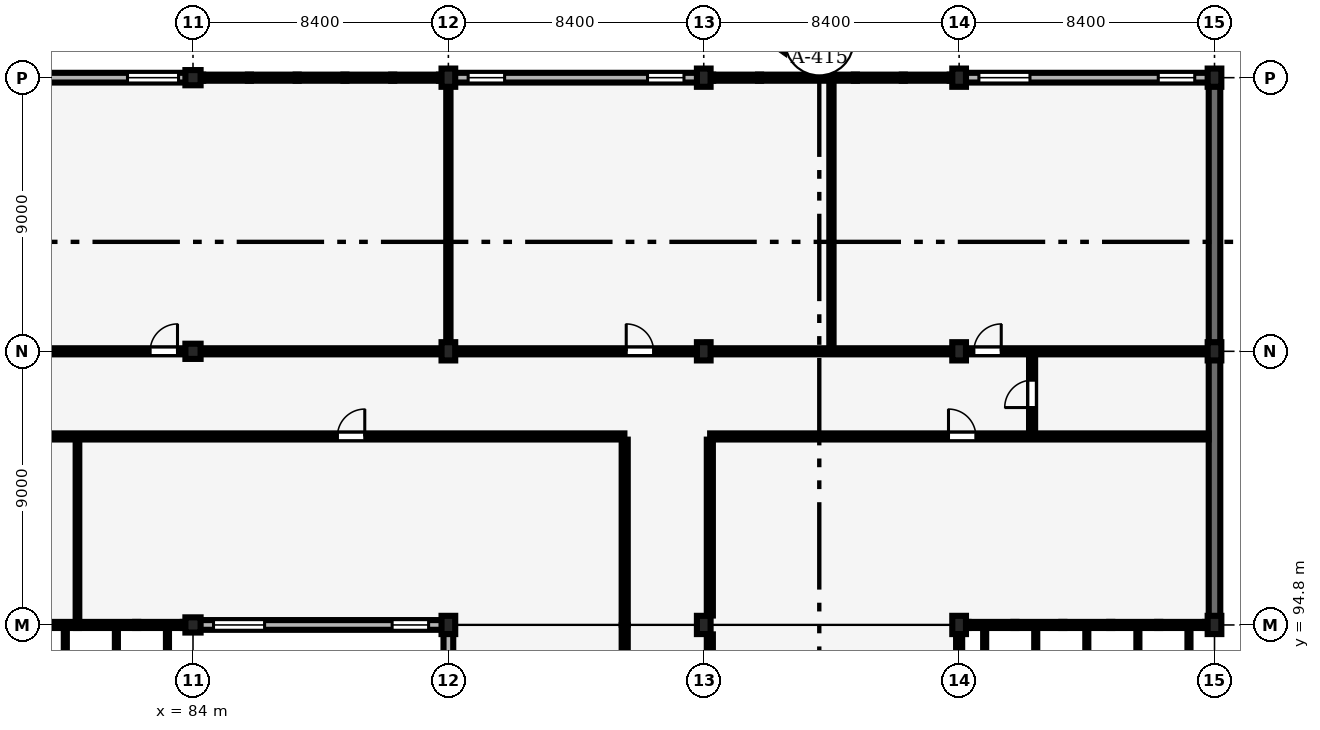
"""IFC4 building model, lengths in metres.
Left out: names, types, materials, properties, quantities, classifications, styles, units other than length and angle.
Written with IfcOpenShell. Run it as: python <this file> out.ifc"""

import sys

from ifc_helpers import new_model, si_unit, direction, frame, frame_2d, origin, origin_2d, place, context, subcontext, project, spatial, rectangle, extrude, element, fill, save


model = new_model("IFC4")
c1 = context("Model", 3, precision=1e-05, world=origin(), true_north=direction((0.0, 1.0)))
c2 = subcontext(c1, "Body", "Model", "MODEL_VIEW")
j1 = project(units=[si_unit("LENGTHUNIT", "METRE"), si_unit("PLANEANGLEUNIT", "RADIAN")], contexts=[c1])
p1 = place(None, origin())
s1 = spatial("IfcSite", under=j1, at=p1, CompositionType="ELEMENT")
p2 = place(p1, origin())
s2 = spatial("IfcBuilding", under=s1, at=p2, CompositionType="ELEMENT")
p3 = place(p2, frame((0.0, 0.0, 13.2)))
s3 = spatial("IfcBuildingStorey", under=s2, at=p3, CompositionType="ELEMENT", Elevation=13.2)
for number, where, z_axis, x_axis in (
    (1, (84.0, 94.8, 0.0), (0.0, 0.0, 1.0), (1.0, 0.0, 0.0)),
    (2, (84.0, 103.8, 0.0), (0.0, 0.0, 1.0), (1.0, 0.0, 0.0)),
    (3, (84.0, 112.8, 0.0), (0.0, 0.0, 1.0), (1.0, 0.0, 0.0)),
):
    element("IfcColumn", number, at=place(p3, frame(where, z_axis=z_axis, x_axis=x_axis)), inside=s3, PredefinedType="COLUMN", context=c2, shape_type="SweptSolid", body=[
        extrude(rectangle(XDim=0.5, YDim=0.5, at=origin_2d()), origin(), (0.0, 0.0, 1.0), 4.2),
    ])
for number, where, z_axis, x_axis in (
    (4, (92.4, 94.8, 0.0), (0.0, 0.0, 1.0), (1.0, 0.0, 0.0)),
    (5, (92.4, 103.8, 0.0), (0.0, 0.0, 1.0), (1.0, 0.0, 0.0)),
    (6, (92.4, 112.8, 0.0), (0.0, 0.0, 1.0), (1.0, 0.0, 0.0)),
    (7, (100.8, 94.8, 0.0), (0.0, 0.0, 1.0), (1.0, 0.0, 0.0)),
    (8, (100.8, 103.8, 0.0), (0.0, 0.0, 1.0), (1.0, 0.0, 0.0)),
    (9, (100.8, 112.8, 0.0), (0.0, 0.0, 1.0), (1.0, 0.0, 0.0)),
    (10, (109.2, 94.8, 0.0), (0.0, 0.0, 1.0), (1.0, 0.0, 0.0)),
    (11, (109.2, 103.8, 0.0), (0.0, 0.0, 1.0), (1.0, 0.0, 0.0)),
    (12, (109.2, 112.8, 0.0), (0.0, 0.0, 1.0), (1.0, 0.0, 0.0)),
    (13, (117.6, 94.8, 0.0), (0.0, 0.0, 1.0), (1.0, 0.0, 0.0)),
    (14, (117.6, 103.8, 0.0), (0.0, 0.0, 1.0), (1.0, 0.0, 0.0)),
    (15, (117.6, 112.8, 0.0), (0.0, 0.0, 1.0), (1.0, 0.0, 0.0)),
):
    element("IfcColumn", number, at=place(p3, frame(where, z_axis=z_axis, x_axis=x_axis)), inside=s3, PredefinedType="COLUMN", context=c2, shape_type="SweptSolid", body=[
        extrude(rectangle(XDim=0.45, YDim=0.6, at=origin_2d()), origin(), (0.0, 0.0, 1.0), 4.2),
    ])
p4 = place(p3, frame((117.6, 95.075, 0.0), z_axis=(0.0, 0.0, 1.0), x_axis=(0.0, 1.0, 0.0)))
e16 = element("IfcWall", 16, at=p4, inside=s3, PredefinedType="SHEAR", context=c2, shape_type="SweptSolid", body=[
    extrude(rectangle(XDim=8.45, YDim=0.38, at=frame_2d((4.225, 0.0))), origin(), (0.0, 0.0, 1.0), 3.43),
])
p5 = place(p3, frame((117.6, 104.075, 0.0), z_axis=(0.0, 0.0, 1.0), x_axis=(0.0, 1.0, 0.0)))
e17 = element("IfcWall", 17, at=p5, inside=s3, PredefinedType="SHEAR", context=c2, shape_type="SweptSolid", body=[
    extrude(rectangle(XDim=8.45, YDim=0.38, at=frame_2d((4.225, 0.0))), origin(), (0.0, 0.0, 1.0), 3.48),
])
p6 = place(p3, frame((75.825, 112.8, 0.0), z_axis=(0.0, 0.0, 1.0), x_axis=(1.0, 0.0, 0.0)))
e18 = element("IfcWall", 18, at=p6, inside=s3, PredefinedType="SOLIDWALL", context=c2, shape_type="SweptSolid", body=[
    extrude(rectangle(XDim=7.95, YDim=0.32, at=frame_2d((3.975, 0.0))), origin(), (0.0, 0.0, 1.0), 2.96),
])
p7 = place(p6, frame((0.45, 0.0, 0.9)))
e19 = element("IfcOpeningElement", 19, at=p7, cuts=e18, PredefinedType="OPENING", context=c2, shape_type="SweptSolid", body=[
    extrude(rectangle(XDim=1.2, YDim=1.8, at=frame_2d((0.6, 0.9))), frame((0.0, 0.17, 0.0), z_axis=(0.0, -1.0, 0.0), x_axis=(1.0, 0.0, 0.0)), (0.0, 0.0, 1.0), 0.34),
])
p8 = place(p6, frame((6.02, 0.0, 0.9)))
e20 = element("IfcOpeningElement", 20, at=p8, cuts=e18, PredefinedType="OPENING", context=c2, shape_type="SweptSolid", body=[
    extrude(rectangle(XDim=1.68, YDim=1.91, at=frame_2d((0.84, 0.955))), frame((0.0, 0.17, 0.0), z_axis=(0.0, -1.0, 0.0), x_axis=(1.0, 0.0, 0.0)), (0.0, 0.0, 1.0), 0.34),
])
p9 = place(p3, frame((92.6, 112.8, 0.0), z_axis=(0.0, 0.0, 1.0), x_axis=(1.0, 0.0, 0.0)))
e21 = element("IfcWall", 21, at=p9, inside=s3, PredefinedType="SOLIDWALL", context=c2, shape_type="SweptSolid", body=[
    extrude(rectangle(XDim=8.0, YDim=0.32, at=frame_2d((4.0, 0.0))), origin(), (0.0, 0.0, 1.0), 3.43),
])
p10 = place(p9, frame((0.45, 0.0, 0.9)))
e22 = element("IfcOpeningElement", 22, at=p10, cuts=e21, PredefinedType="OPENING", context=c2, shape_type="SweptSolid", body=[
    extrude(rectangle(XDim=1.2, YDim=1.5, at=frame_2d((0.6, 0.75))), frame((0.0, 0.17, 0.0), z_axis=(0.0, -1.0, 0.0), x_axis=(1.0, 0.0, 0.0)), (0.0, 0.0, 1.0), 0.34),
])
p11 = place(p9, frame((6.35, 0.0, 0.9)))
e23 = element("IfcOpeningElement", 23, at=p11, cuts=e21, PredefinedType="OPENING", context=c2, shape_type="SweptSolid", body=[
    extrude(rectangle(XDim=1.2, YDim=1.8, at=frame_2d((0.6, 0.9))), frame((0.0, 0.17, 0.0), z_axis=(0.0, -1.0, 0.0), x_axis=(1.0, 0.0, 0.0)), (0.0, 0.0, 1.0), 0.34),
])
p12 = place(p3, frame((109.4, 112.8, 0.0), z_axis=(0.0, 0.0, 1.0), x_axis=(1.0, 0.0, 0.0)))
e24 = element("IfcWall", 24, at=p12, inside=s3, PredefinedType="SOLIDWALL", context=c2, shape_type="SweptSolid", body=[
    extrude(rectangle(XDim=8.0, YDim=0.32, at=frame_2d((4.0, 0.0))), origin(), (0.0, 0.0, 1.0), 3.43),
])
p13 = place(p12, frame((0.45, 0.0, 0.9)))
e25 = element("IfcOpeningElement", 25, at=p13, cuts=e24, PredefinedType="OPENING", context=c2, shape_type="SweptSolid", body=[
    extrude(rectangle(XDim=1.68, YDim=2.4, at=frame_2d((0.84, 1.2))), frame((0.0, 0.17, 0.0), z_axis=(0.0, -1.0, 0.0), x_axis=(1.0, 0.0, 0.0)), (0.0, 0.0, 1.0), 0.34),
])
p14 = place(p12, frame((6.35, 0.0, 0.9)))
e26 = element("IfcOpeningElement", 26, at=p14, cuts=e24, PredefinedType="OPENING", context=c2, shape_type="SweptSolid", body=[
    extrude(rectangle(XDim=1.2, YDim=1.5, at=frame_2d((0.6, 0.75))), frame((0.0, 0.17, 0.0), z_axis=(0.0, -1.0, 0.0), x_axis=(1.0, 0.0, 0.0)), (0.0, 0.0, 1.0), 0.34),
])
p15 = place(p3, frame((84.225, 94.8, 0.0), z_axis=(0.0, 0.0, 1.0), x_axis=(1.0, 0.0, 0.0)))
e27 = element("IfcWall", 27, at=p15, inside=s3, PredefinedType="SOLIDWALL", context=c2, shape_type="SweptSolid", body=[
    extrude(rectangle(XDim=7.975, YDim=0.32, at=frame_2d((3.987, 0.0))), origin(), (0.0, 0.0, 1.0), 3.48),
])
p16 = place(p15, frame((0.45, 0.0, 0.9)))
e28 = element("IfcOpeningElement", 28, at=p16, cuts=e27, PredefinedType="OPENING", context=c2, shape_type="SweptSolid", body=[
    extrude(rectangle(XDim=1.68, YDim=2.4, at=frame_2d((0.84, 1.2))), frame((0.0, 0.17, 0.0), z_axis=(0.0, -1.0, 0.0), x_axis=(1.0, 0.0, 0.0)), (0.0, 0.0, 1.0), 0.34),
])
p17 = place(p15, frame((6.325, 0.0, 0.9)))
e29 = element("IfcOpeningElement", 29, at=p17, cuts=e27, PredefinedType="OPENING", context=c2, shape_type="SweptSolid", body=[
    extrude(rectangle(XDim=1.2, YDim=1.5, at=frame_2d((0.6, 0.75))), frame((0.0, 0.17, 0.0), z_axis=(0.0, -1.0, 0.0), x_axis=(1.0, 0.0, 0.0)), (0.0, 0.0, 1.0), 0.34),
])
p18 = place(p3, frame((92.4, 86.075, 0.0), z_axis=(0.0, 0.0, 1.0), x_axis=(0.0, 1.0, 0.0)))
e30 = element("IfcWall", 30, at=p18, inside=s3, PredefinedType="SOLIDWALL", context=c2, shape_type="SweptSolid", body=[
    extrude(rectangle(XDim=8.45, YDim=0.32, at=frame_2d((4.225, 0.0))), origin(), (0.0, 0.0, 1.0), 3.48),
])
p19 = place(p18, frame((3.025, 0.0, 0.9)))
e31 = element("IfcOpeningElement", 31, at=p19, cuts=e30, PredefinedType="OPENING", context=c2, shape_type="SweptSolid", body=[
    extrude(rectangle(XDim=2.4, YDim=1.8, at=frame_2d((1.2, 0.9))), frame((0.0, 0.17, 0.0), z_axis=(0.0, -1.0, 0.0), x_axis=(1.0, 0.0, 0.0)), (0.0, 0.0, 1.0), 0.34),
])
p20 = place(p3, frame((111.6, 101.01, 0.0), z_axis=(0.0, 0.0, 1.0), x_axis=(0.0, 1.0, 0.0)))
e32 = element("IfcWall", 32, at=p20, inside=s3, PredefinedType="PARTITIONING", context=c2, shape_type="SweptSolid", body=[
    extrude(rectangle(XDim=2.78, YDim=0.2, at=frame_2d((1.39, 0.0))), origin(), (0.0, 0.0, 1.0), 3.9),
])
p21 = place(p20, frame((0.94, 0.0, 0.0)))
e33 = element("IfcOpeningElement", 33, at=p21, cuts=e32, PredefinedType="OPENING", context=c2, shape_type="SweptSolid", body=[
    extrude(rectangle(XDim=0.9, YDim=2.1, at=frame_2d((0.45, 1.05))), frame((0.0, 0.11, 0.0), z_axis=(0.0, -1.0, 0.0), x_axis=(1.0, 0.0, 0.0)), (0.0, 0.0, 1.0), 0.22),
])
p22 = place(p3, frame((92.4, 103.905, 0.0), z_axis=(0.0, 0.0, 1.0), x_axis=(0.0, 1.0, 0.0)))
e34 = element("IfcWall", 34, at=p22, inside=s3, PredefinedType="PARTITIONING", context=c2, shape_type="SweptSolid", body=[
    extrude(rectangle(XDim=8.79, YDim=0.14, at=frame_2d((4.395, 0.0))), origin(), (0.0, 0.0, 1.0), 3.48),
])
p23 = place(p3, frame((105.0, 103.905, 0.0), z_axis=(0.0, 0.0, 1.0), x_axis=(0.0, 1.0, 0.0)))
e35 = element("IfcWall", 35, at=p23, inside=s3, PredefinedType="PARTITIONING", context=c2, shape_type="SweptSolid", body=[
    extrude(rectangle(XDim=8.79, YDim=0.14, at=frame_2d((4.395, 0.0))), origin(), (0.0, 0.0, 1.0), 3.9),
])
p24 = place(p3, frame((75.86, 103.8, 0.0), z_axis=(0.0, 0.0, 1.0), x_axis=(1.0, 0.0, 0.0)))
e36 = element("IfcWall", 36, at=p24, inside=s3, PredefinedType="PARTITIONING", context=c2, shape_type="SweptSolid", body=[
    extrude(rectangle(XDim=7.88, YDim=0.2, at=frame_2d((3.94, 0.0))), origin(), (0.0, 0.0, 1.0), 3.21),
])
p25 = place(p24, frame((6.73, 0.0, 0.0)))
e37 = element("IfcOpeningElement", 37, at=p25, cuts=e36, PredefinedType="OPENING", context=c2, shape_type="SweptSolid", body=[
    extrude(rectangle(XDim=0.9, YDim=2.1, at=frame_2d((0.45, 1.05))), frame((0.0, 0.11, 0.0), z_axis=(0.0, -1.0, 0.0), x_axis=(1.0, 0.0, 0.0)), (0.0, 0.0, 1.0), 0.22),
])
p26 = place(p3, frame((84.26, 103.8, 0.0), z_axis=(0.0, 0.0, 1.0), x_axis=(1.0, 0.0, 0.0)))
e38 = element("IfcWall", 38, at=p26, inside=s3, PredefinedType="PARTITIONING", context=c2, shape_type="SweptSolid", body=[
    extrude(rectangle(XDim=7.905, YDim=0.2, at=frame_2d((3.953, 0.0))), origin(), (0.0, 0.0, 1.0), 3.43),
])
p27 = place(p3, frame((92.635, 103.8, 0.0), z_axis=(0.0, 0.0, 1.0), x_axis=(1.0, 0.0, 0.0)))
e39 = element("IfcWall", 39, at=p27, inside=s3, PredefinedType="PARTITIONING", context=c2, shape_type="SweptSolid", body=[
    extrude(rectangle(XDim=7.93, YDim=0.2, at=frame_2d((3.965, 0.0))), origin(), (0.0, 0.0, 1.0), 3.48),
])
p28 = place(p27, frame((5.615, 0.0, 0.0)))
e40 = element("IfcOpeningElement", 40, at=p28, cuts=e39, PredefinedType="OPENING", context=c2, shape_type="SweptSolid", body=[
    extrude(rectangle(XDim=0.9, YDim=2.1, at=frame_2d((0.45, 1.05))), frame((0.0, 0.11, 0.0), z_axis=(0.0, -1.0, 0.0), x_axis=(1.0, 0.0, 0.0)), (0.0, 0.0, 1.0), 0.22),
])
p29 = place(p3, frame((101.035, 103.8, 0.0), z_axis=(0.0, 0.0, 1.0), x_axis=(1.0, 0.0, 0.0)))
e41 = element("IfcWall", 41, at=p29, inside=s3, PredefinedType="PARTITIONING", context=c2, shape_type="SweptSolid", body=[
    extrude(rectangle(XDim=7.93, YDim=0.2, at=frame_2d((3.965, 0.0))), origin(), (0.0, 0.0, 1.0), 3.43),
])
p30 = place(p3, frame((109.435, 103.8, 0.0), z_axis=(0.0, 0.0, 1.0), x_axis=(1.0, 0.0, 0.0)))
e42 = element("IfcWall", 42, at=p30, inside=s3, PredefinedType="PARTITIONING", context=c2, shape_type="SweptSolid", body=[
    extrude(rectangle(XDim=7.97, YDim=0.2, at=frame_2d((3.985, 0.0))), origin(), (0.0, 0.0, 1.0), 3.48),
])
p31 = place(p30, frame((0.25, 0.0, 0.0)))
e43 = element("IfcOpeningElement", 43, at=p31, cuts=e42, PredefinedType="OPENING", context=c2, shape_type="SweptSolid", body=[
    extrude(rectangle(XDim=0.9, YDim=2.1, at=frame_2d((0.45, 1.05))), frame((0.0, 0.11, 0.0), z_axis=(0.0, -1.0, 0.0), x_axis=(1.0, 0.0, 0.0)), (0.0, 0.0, 1.0), 0.22),
])
p32 = place(p3, frame((80.2, 94.905, 0.0), z_axis=(0.0, 0.0, 1.0), x_axis=(0.0, 1.0, 0.0)))
e44 = element("IfcWall", 44, at=p32, inside=s3, PredefinedType="PARTITIONING", context=c2, shape_type="SweptSolid", body=[
    extrude(rectangle(XDim=5.99, YDim=0.12, at=frame_2d((2.995, 0.0))), origin(), (0.0, 0.0, 1.0), 3.9),
])
p33 = place(p3, frame((62.31, 101.0, 0.0), z_axis=(0.0, 0.0, 1.0), x_axis=(1.0, 0.0, 0.0)))
e45 = element("IfcWall", 45, at=p33, inside=s3, PredefinedType="PARTITIONING", context=c2, shape_type="SweptSolid", body=[
    extrude(rectangle(XDim=35.88, YDim=0.2, at=frame_2d((17.94, 0.0))), origin(), (0.0, 0.0, 1.0), 3.451),
])
p34 = place(p33, frame((8.49, 0.0, 0.0)))
e46 = element("IfcOpeningElement", 46, at=p34, cuts=e45, PredefinedType="OPENING", context=c2, shape_type="SweptSolid", body=[
    extrude(rectangle(XDim=0.9, YDim=2.1, at=frame_2d((0.45, 1.05))), frame((0.0, 0.11, 0.0), z_axis=(0.0, -1.0, 0.0), x_axis=(1.0, 0.0, 0.0)), (0.0, 0.0, 1.0), 0.22),
])
p35 = place(p33, frame((26.44, 0.0, 0.0)))
e47 = element("IfcOpeningElement", 47, at=p35, cuts=e45, PredefinedType="OPENING", context=c2, shape_type="SweptSolid", body=[
    extrude(rectangle(XDim=0.9, YDim=2.1, at=frame_2d((0.45, 1.05))), frame((0.0, 0.11, 0.0), z_axis=(0.0, -1.0, 0.0), x_axis=(1.0, 0.0, 0.0)), (0.0, 0.0, 1.0), 0.22),
])
p36 = place(p3, frame((98.2, 94.81, 0.0), z_axis=(0.0, 0.0, 1.0), x_axis=(0.0, 1.0, 0.0)))
e48 = element("IfcWall", 48, at=p36, inside=s3, PredefinedType="PARTITIONING", context=c2, shape_type="SweptSolid", body=[
    extrude(rectangle(XDim=6.085, YDim=0.2, at=frame_2d((3.042, 0.0))), origin(), (0.0, 0.0, 1.0), 3.9),
])
p37 = place(p3, frame((101.01, 101.0, 0.0), z_axis=(0.0, 0.0, 1.0), x_axis=(1.0, 0.0, 0.0)))
e49 = element("IfcWall", 49, at=p37, inside=s3, PredefinedType="PARTITIONING", context=c2, shape_type="SweptSolid", body=[
    extrude(rectangle(XDim=16.395, YDim=0.2, at=frame_2d((8.198, 0.0))), origin(), (0.0, 0.0, 1.0), 3.451),
])
p38 = place(p37, frame((7.84, 0.0, 0.0)))
e50 = element("IfcOpeningElement", 50, at=p38, cuts=e49, PredefinedType="OPENING", context=c2, shape_type="SweptSolid", body=[
    extrude(rectangle(XDim=0.9, YDim=2.1, at=frame_2d((0.45, 1.05))), frame((0.0, 0.11, 0.0), z_axis=(0.0, -1.0, 0.0), x_axis=(1.0, 0.0, 0.0)), (0.0, 0.0, 1.0), 0.22),
])
p39 = place(p3, frame((101.0, 95.11, 0.0), z_axis=(0.0, 0.0, 1.0), x_axis=(0.0, 1.0, 0.0)))
e51 = element("IfcWall", 51, at=p39, inside=s3, PredefinedType="PARTITIONING", context=c2, shape_type="SweptSolid", body=[
    extrude(rectangle(XDim=5.785, YDim=0.2, at=frame_2d((2.893, 0.0))), origin(), (0.0, 0.0, 1.0), 3.48),
])
p40 = place(p3, frame((98.2, 85.81, 0.0), z_axis=(0.0, 0.0, 1.0), x_axis=(0.0, 1.0, 0.0)))
e52 = element("IfcWall", 52, at=p40, inside=s3, PredefinedType="PARTITIONING", context=c2, shape_type="SweptSolid", body=[
    extrude(rectangle(XDim=8.98, YDim=0.2, at=frame_2d((4.49, 0.0))), origin(), (0.0, 0.0, 1.0), 3.9),
])
p41 = place(p40, frame((3.99, 0.0, 0.0)))
e53 = element("IfcOpeningElement", 53, at=p41, cuts=e52, PredefinedType="OPENING", context=c2, shape_type="SweptSolid", body=[
    extrude(rectangle(XDim=1.0, YDim=2.15, at=frame_2d((0.5, 1.075))), frame((0.0, 0.11, 0.0), z_axis=(0.0, -1.0, 0.0), x_axis=(1.0, 0.0, 0.0)), (0.0, 0.0, 1.0), 0.22),
])
p42 = place(p3, frame((101.0, 86.11, 0.0), z_axis=(0.0, 0.0, 1.0), x_axis=(0.0, 1.0, 0.0)))
e54 = element("IfcWall", 54, at=p42, inside=s3, PredefinedType="PARTITIONING", context=c2, shape_type="SweptSolid", body=[
    extrude(rectangle(XDim=8.38, YDim=0.2, at=frame_2d((4.19, 0.0))), origin(), (0.0, 0.0, 1.0), 3.43),
])
p43 = place(p42, frame((3.69, 0.0, 0.0)))
e55 = element("IfcOpeningElement", 55, at=p43, cuts=e54, PredefinedType="OPENING", context=c2, shape_type="SweptSolid", body=[
    extrude(rectangle(XDim=1.0, YDim=2.15, at=frame_2d((0.5, 1.075))), frame((0.0, 0.11, 0.0), z_axis=(0.0, -1.0, 0.0), x_axis=(1.0, 0.0, 0.0)), (0.0, 0.0, 1.0), 0.22),
])
p44 = place(p8, origin())
e56 = element("IfcWindow", 56, at=p44, inside=s3, PartitioningType="SINGLE_PANEL", PredefinedType="WINDOW", context=c2, shape_type="SweptSolid", body=[
    extrude(rectangle(XDim=1.68, YDim=1.91, at=frame_2d((0.84, 0.955))), frame((0.0, 0.03, 0.0), z_axis=(0.0, -1.0, 0.0), x_axis=(1.0, 0.0, 0.0)), (0.0, 0.0, 1.0), 0.06),
])
fill(e20, e56)
p45 = place(p10, origin())
e57 = element("IfcWindow", 57, at=p45, inside=s3, PartitioningType="SINGLE_PANEL", PredefinedType="WINDOW", context=c2, shape_type="SweptSolid", body=[
    extrude(rectangle(XDim=1.2, YDim=1.5, at=frame_2d((0.6, 0.75))), frame((0.0, 0.03, 0.0), z_axis=(0.0, -1.0, 0.0), x_axis=(1.0, 0.0, 0.0)), (0.0, 0.0, 1.0), 0.06),
])
fill(e22, e57)
p46 = place(p11, origin())
e58 = element("IfcWindow", 58, at=p46, inside=s3, PartitioningType="SINGLE_PANEL", PredefinedType="WINDOW", context=c2, shape_type="SweptSolid", body=[
    extrude(rectangle(XDim=1.2, YDim=1.8, at=frame_2d((0.6, 0.9))), frame((0.0, 0.03, 0.0), z_axis=(0.0, -1.0, 0.0), x_axis=(1.0, 0.0, 0.0)), (0.0, 0.0, 1.0), 0.06),
])
fill(e23, e58)
p47 = place(p13, origin())
e59 = element("IfcWindow", 59, at=p47, inside=s3, PartitioningType="SINGLE_PANEL", PredefinedType="WINDOW", context=c2, shape_type="SweptSolid", body=[
    extrude(rectangle(XDim=1.68, YDim=2.4, at=frame_2d((0.84, 1.2))), frame((0.0, 0.03, 0.0), z_axis=(0.0, -1.0, 0.0), x_axis=(1.0, 0.0, 0.0)), (0.0, 0.0, 1.0), 0.06),
])
fill(e25, e59)
p48 = place(p14, origin())
e60 = element("IfcWindow", 60, at=p48, inside=s3, PartitioningType="SINGLE_PANEL", PredefinedType="WINDOW", context=c2, shape_type="SweptSolid", body=[
    extrude(rectangle(XDim=1.2, YDim=1.5, at=frame_2d((0.6, 0.75))), frame((0.0, 0.03, 0.0), z_axis=(0.0, -1.0, 0.0), x_axis=(1.0, 0.0, 0.0)), (0.0, 0.0, 1.0), 0.06),
])
fill(e26, e60)
p49 = place(p16, origin())
e61 = element("IfcWindow", 61, at=p49, inside=s3, PartitioningType="SINGLE_PANEL", PredefinedType="WINDOW", context=c2, shape_type="SweptSolid", body=[
    extrude(rectangle(XDim=1.68, YDim=2.4, at=frame_2d((0.84, 1.2))), frame((0.0, 0.03, 0.0), z_axis=(0.0, -1.0, 0.0), x_axis=(1.0, 0.0, 0.0)), (0.0, 0.0, 1.0), 0.06),
])
fill(e28, e61)
p50 = place(p17, origin())
e62 = element("IfcWindow", 62, at=p50, inside=s3, PartitioningType="SINGLE_PANEL", PredefinedType="WINDOW", context=c2, shape_type="SweptSolid", body=[
    extrude(rectangle(XDim=1.2, YDim=1.5, at=frame_2d((0.6, 0.75))), frame((0.0, 0.03, 0.0), z_axis=(0.0, -1.0, 0.0), x_axis=(1.0, 0.0, 0.0)), (0.0, 0.0, 1.0), 0.06),
])
fill(e29, e62)
p51 = place(p21, origin())
e63 = element("IfcDoor", 63, at=p51, inside=s3, OperationType="SINGLE_SWING_LEFT", PredefinedType="DOOR", context=c2, shape_type="SweptSolid", body=[
    extrude(rectangle(XDim=0.9, YDim=2.1, at=frame_2d((0.45, 1.05))), frame((0.0, 0.025, 0.0), z_axis=(0.0, -1.0, 0.0), x_axis=(1.0, 0.0, 0.0)), (0.0, 0.0, 1.0), 0.05),
])
fill(e33, e63)
p52 = place(p25, origin())
e64 = element("IfcDoor", 64, at=p52, inside=s3, OperationType="SINGLE_SWING_RIGHT", PredefinedType="DOOR", context=c2, shape_type="SweptSolid", body=[
    extrude(rectangle(XDim=0.9, YDim=2.1, at=frame_2d((0.45, 1.05))), frame((0.0, 0.025, 0.0), z_axis=(0.0, -1.0, 0.0), x_axis=(1.0, 0.0, 0.0)), (0.0, 0.0, 1.0), 0.05),
])
fill(e37, e64)
p53 = place(p28, origin())
e65 = element("IfcDoor", 65, at=p53, inside=s3, OperationType="SINGLE_SWING_LEFT", PredefinedType="DOOR", context=c2, shape_type="SweptSolid", body=[
    extrude(rectangle(XDim=0.9, YDim=2.1, at=frame_2d((0.45, 1.05))), frame((0.0, 0.025, 0.0), z_axis=(0.0, -1.0, 0.0), x_axis=(1.0, 0.0, 0.0)), (0.0, 0.0, 1.0), 0.05),
])
fill(e40, e65)
p54 = place(p31, origin())
e66 = element("IfcDoor", 66, at=p54, inside=s3, OperationType="SINGLE_SWING_RIGHT", PredefinedType="DOOR", context=c2, shape_type="SweptSolid", body=[
    extrude(rectangle(XDim=0.9, YDim=2.1, at=frame_2d((0.45, 1.05))), frame((0.0, 0.025, 0.0), z_axis=(0.0, -1.0, 0.0), x_axis=(1.0, 0.0, 0.0)), (0.0, 0.0, 1.0), 0.05),
])
fill(e43, e66)
p55 = place(p35, origin())
e67 = element("IfcDoor", 67, at=p55, inside=s3, OperationType="SINGLE_SWING_RIGHT", PredefinedType="DOOR", context=c2, shape_type="SweptSolid", body=[
    extrude(rectangle(XDim=0.9, YDim=2.1, at=frame_2d((0.45, 1.05))), frame((0.0, 0.025, 0.0), z_axis=(0.0, -1.0, 0.0), x_axis=(1.0, 0.0, 0.0)), (0.0, 0.0, 1.0), 0.05),
])
fill(e47, e67)
p56 = place(p38, origin())
e68 = element("IfcDoor", 68, at=p56, inside=s3, OperationType="SINGLE_SWING_LEFT", PredefinedType="DOOR", context=c2, shape_type="SweptSolid", body=[
    extrude(rectangle(XDim=0.9, YDim=2.1, at=frame_2d((0.45, 1.05))), frame((0.0, 0.025, 0.0), z_axis=(0.0, -1.0, 0.0), x_axis=(1.0, 0.0, 0.0)), (0.0, 0.0, 1.0), 0.05),
])
fill(e50, e68)
save(model, sys.argv[1])
